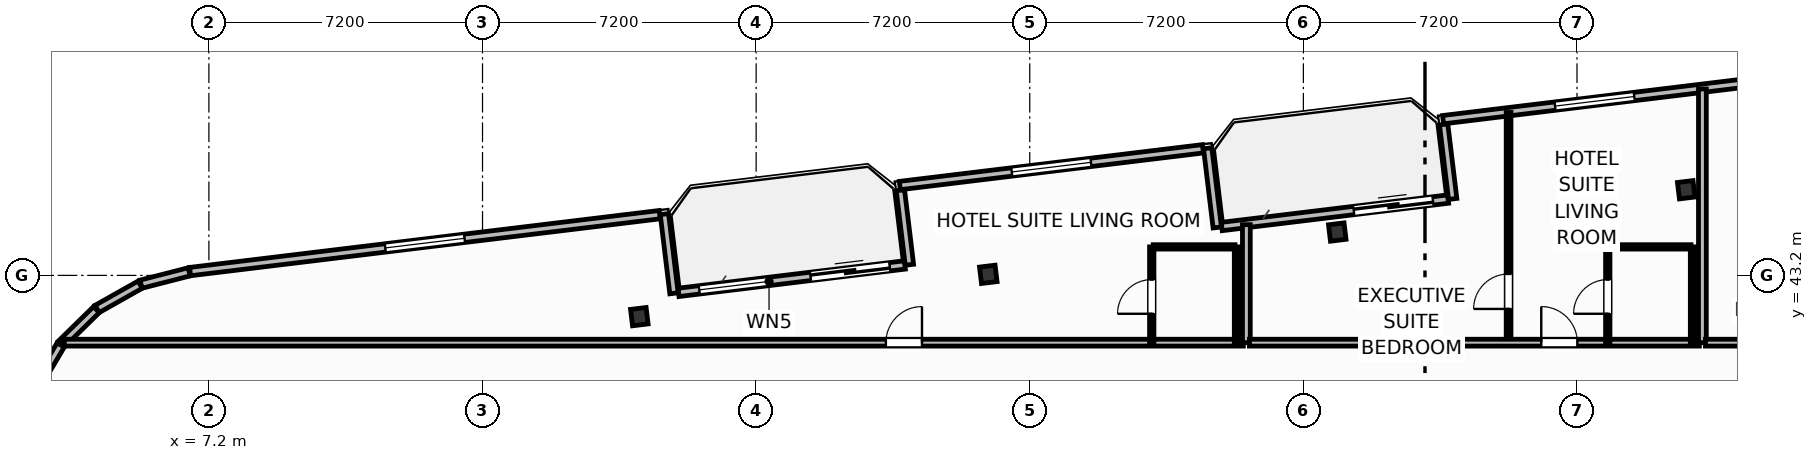
"""IFC4 building model, lengths in metres.
Left out: names, types, materials, properties, quantities, classifications, styles, units other than length and angle.
Written with IfcOpenShell. Run it as: python <this file> out.ifc"""

import sys

from ifc_helpers import new_model, si_unit, direction, frame, frame_2d, origin, origin_2d, place, context, subcontext, project, spatial, rectangle, i_section, extrude, element, fill, save


model = new_model("IFC4")
c1 = context("Model", 3, precision=1e-05, world=origin(), true_north=direction((0.0, 1.0)))
c2 = subcontext(c1, "Body", "Model", "MODEL_VIEW")
j1 = project(units=[si_unit("LENGTHUNIT", "METRE"), si_unit("PLANEANGLEUNIT", "RADIAN")], contexts=[c1])
p1 = place(None, origin())
s1 = spatial("IfcSite", under=j1, at=p1, CompositionType="ELEMENT")
p2 = place(p1, origin())
s2 = spatial("IfcBuilding", under=s1, at=p2, CompositionType="ELEMENT")
p3 = place(p2, frame((0.0, 0.0, 170.9)))
s3 = spatial("IfcBuildingStorey", under=s2, at=p3, CompositionType="ELEMENT", Elevation=170.9)
for number, where, z_axis, x_axis in (
    (1, (46.075, 45.454, 0.0), (0.0, 0.0, 1.0), (0.993, 0.12, 0.0)),
    (2, (36.892, 44.341, 0.0), (0.0, 0.0, 1.0), (0.993, 0.12, 0.0)),
    (3, (27.709, 43.227, 0.0), (0.0, 0.0, 1.0), (0.993, 0.12, 0.0)),
    (4, (18.526, 42.114, 0.0), (0.0, 0.0, 1.0), (0.993, 0.12, 0.0)),
):
    element("IfcColumn", number, at=place(p3, frame(where, z_axis=z_axis, x_axis=x_axis)), inside=s3, PredefinedType="COLUMN", context=c2, shape_type="SweptSolid", body=[
        extrude(i_section(OverallWidth=0.412, OverallDepth=0.435, WebThickness=0.036, FlangeThickness=0.057, FilletRadius=0.025, at=origin_2d()), origin(), (0.0, 0.0, 1.0), 3.7),
    ])
p4 = place(p3, frame((19.557, 42.753, 0.0), z_axis=(0.0, 0.0, 1.0), x_axis=(0.992729951822, 0.120362962556, 0.0)))
e5 = element("IfcWall", 5, at=p4, inside=s3, PredefinedType="SOLIDWALL", context=c2, shape_type="SweptSolid", body=[
    extrude(rectangle(XDim=6.0, YDim=0.22, at=frame_2d((3.0, 0.0))), origin(), (0.0, 0.0, 1.0), 2.73),
])
p5 = place(p4, frame((3.5, 0.0, 0.0)))
e6 = element("IfcOpeningElement", 6, at=p5, cuts=e5, PredefinedType="OPENING", context=c2, shape_type="SweptSolid", body=[
    extrude(rectangle(XDim=2.1, YDim=2.3, at=frame_2d((1.05, 1.15))), frame((0.0, 0.12, 0.0), z_axis=(0.0, -1.0, 0.0), x_axis=(1.0, 0.0, 0.0)), (0.0, 0.0, 1.0), 0.24),
])
p6 = place(p4, frame((0.55, 0.0, 0.75)))
e7 = element("IfcOpeningElement", 7, at=p6, cuts=e5, PredefinedType="OPENING", context=c2, shape_type="SweptSolid", body=[
    extrude(rectangle(XDim=1.85, YDim=1.75, at=frame_2d((0.925, 0.875))), frame((0.0, 0.12, 0.0), z_axis=(0.0, -1.0, 0.0), x_axis=(1.0, 0.0, 0.0)), (0.0, 0.0, 1.0), 0.24),
])
p7 = place(p3, frame((33.852, 44.486, 0.0), z_axis=(0.0, 0.0, 1.0), x_axis=(0.992729951822, 0.120362962556, 0.0)))
e8 = element("IfcWall", 8, at=p7, inside=s3, PredefinedType="SOLIDWALL", context=c2, shape_type="SweptSolid", body=[
    extrude(rectangle(XDim=6.0, YDim=0.22, at=frame_2d((3.0, 0.0))), origin(), (0.0, 0.0, 1.0), 2.73),
])
p8 = place(p7, frame((3.5, 0.0, 0.0)))
e9 = element("IfcOpeningElement", 9, at=p8, cuts=e8, PredefinedType="OPENING", context=c2, shape_type="SweptSolid", body=[
    extrude(rectangle(XDim=2.1, YDim=2.3, at=frame_2d((1.05, 1.15))), frame((0.0, 0.12, 0.0), z_axis=(0.0, -1.0, 0.0), x_axis=(1.0, 0.0, 0.0)), (0.0, 0.0, 1.0), 0.24),
])
p9 = place(p3, frame((47.653, 48.264, 0.0), z_axis=(0.0, 0.0, 1.0), x_axis=(-0.992731032022, -0.120354052946, 0.0)))
e10 = element("IfcWall", 10, at=p9, inside=s3, PredefinedType="SOLIDWALL", context=c2, shape_type="SweptSolid", body=[
    extrude(rectangle(XDim=8.035, YDim=0.22, at=frame_2d((4.018, 0.0))), origin(), (0.0, 0.0, 1.0), 2.73),
])
p10 = place(p9, frame((2.968, 0.0, 0.8)))
e11 = element("IfcOpeningElement", 11, at=p10, cuts=e10, PredefinedType="OPENING", context=c2, shape_type="SweptSolid", body=[
    extrude(rectangle(XDim=2.1, YDim=1.75, at=frame_2d((1.05, 0.875))), frame((0.0, 0.12, 0.0), z_axis=(0.0, -1.0, 0.0), x_axis=(1.0, 0.0, 0.0)), (0.0, 0.0, 1.0), 0.24),
])
p11 = place(p3, frame((39.691, 47.173, 0.0), z_axis=(0.0, 0.0, 1.0), x_axis=(0.120397815541, -0.992725725472, 0.0)))
e12 = element("IfcWall", 12, at=p11, inside=s3, PredefinedType="SOLIDWALL", context=c2, shape_type="SweptSolid", body=[
    extrude(rectangle(XDim=1.975, YDim=0.22, at=frame_2d((0.988, 0.0))), origin(), (0.0, 0.0, 1.0), 2.73),
])
p12 = place(p3, frame((33.734, 44.461, 0.0), z_axis=(0.0, 0.0, 1.0), x_axis=(-0.120327895535, 0.992734202874, 0.0)))
e13 = element("IfcWall", 13, at=p12, inside=s3, PredefinedType="SOLIDWALL", context=c2, shape_type="SweptSolid", body=[
    extrude(rectangle(XDim=2.1, YDim=0.22, at=frame_2d((1.05, 0.0))), origin(), (0.0, 0.0, 1.0), 2.73),
])
p13 = place(p3, frame((33.357, 46.531, 0.0), z_axis=(0.0, 0.0, 1.0), x_axis=(-0.992731032022, -0.120354052946, 0.0)))
e14 = element("IfcWall", 14, at=p13, inside=s3, PredefinedType="SOLIDWALL", context=c2, shape_type="SweptSolid", body=[
    extrude(rectangle(XDim=8.035, YDim=0.22, at=frame_2d((4.018, 0.0))), origin(), (0.0, 0.0, 1.0), 2.73),
])
p14 = place(p13, frame((2.968, 0.0, 0.8)))
e15 = element("IfcOpeningElement", 15, at=p14, cuts=e14, PredefinedType="OPENING", context=c2, shape_type="SweptSolid", body=[
    extrude(rectangle(XDim=2.1, YDim=1.75, at=frame_2d((1.05, 0.875))), frame((0.0, 0.12, 0.0), z_axis=(0.0, -1.0, 0.0), x_axis=(1.0, 0.0, 0.0)), (0.0, 0.0, 1.0), 0.24),
])
p15 = place(p3, frame((25.396, 45.44, 0.0), z_axis=(0.0, 0.0, 1.0), x_axis=(0.120275992932, -0.992740492538, 0.0)))
e16 = element("IfcWall", 16, at=p15, inside=s3, PredefinedType="SOLIDWALL", context=c2, shape_type="SweptSolid", body=[
    extrude(rectangle(XDim=1.975, YDim=0.22, at=frame_2d((0.988, 0.0))), origin(), (0.0, 0.0, 1.0), 2.73),
])
p16 = place(p3, frame((19.439, 42.729, 0.0), z_axis=(0.0, 0.0, 1.0), x_axis=(-0.120327895535, 0.992734202874, 0.0)))
e17 = element("IfcWall", 17, at=p16, inside=s3, PredefinedType="SOLIDWALL", context=c2, shape_type="SweptSolid", body=[
    extrude(rectangle(XDim=2.1, YDim=0.22, at=frame_2d((1.05, 0.0))), origin(), (0.0, 0.0, 1.0), 2.73),
])
p17 = place(p3, frame((19.062, 44.798, 0.0), z_axis=(0.0, 0.0, 1.0), x_axis=(-0.992733569027, -0.120333124809, 0.0)))
e18 = element("IfcWall", 18, at=p17, inside=s3, PredefinedType="SOLIDWALL", context=c2, shape_type="SweptSolid", body=[
    extrude(rectangle(XDim=12.447, YDim=0.22, at=frame_2d((6.224, 0.0))), origin(), (0.0, 0.0, 1.0), 2.73),
])
p18 = place(p17, frame((5.174, 0.0, 0.8)))
e19 = element("IfcOpeningElement", 19, at=p18, cuts=e18, PredefinedType="OPENING", context=c2, shape_type="SweptSolid", body=[
    extrude(rectangle(XDim=2.1, YDim=1.75, at=frame_2d((1.05, 0.875))), frame((0.0, 0.12, 0.0), z_axis=(0.0, -1.0, 0.0), x_axis=(1.0, 0.0, 0.0)), (0.0, 0.0, 1.0), 0.24),
])
p19 = place(p3, frame((6.681, 43.294, 0.0), z_axis=(0.0, 0.0, 1.0), x_axis=(-0.968496788899, -0.2490260426, 0.0)))
e20 = element("IfcWall", 20, at=p19, inside=s3, PredefinedType="SOLIDWALL", context=c2, shape_type="SweptSolid", body=[
    extrude(rectangle(XDim=1.309, YDim=0.22, at=frame_2d((0.654, 0.0))), origin(), (0.0, 0.0, 1.0), 2.73),
])
for number, where, z_axis, x_axis in (
    (21, (5.392, 42.956, 0.0), (0.0, 0.0, 1.0), (-0.871, -0.491, 0.0)),
    (22, (4.241, 42.3, 0.0), (0.0, 0.0, 1.0), (-0.714, -0.7, 0.0)),
):
    element("IfcWall", number, at=place(p3, frame(where, z_axis=z_axis, x_axis=x_axis)), inside=s3, PredefinedType="SOLIDWALL", context=c2, shape_type="SweptSolid", body=[
        extrude(rectangle(XDim=1.301, YDim=0.22, at=frame_2d((0.65, 0.0))), origin(), (0.0, 0.0, 1.0), 2.73),
    ])
p20 = place(p3, frame((3.299, 41.368, 0.0), z_axis=(0.0, 0.0, 1.0), x_axis=(-0.508716668029, -0.860933999601, 0.0)))
e23 = element("IfcWall", 23, at=p20, inside=s3, PredefinedType="SOLIDWALL", context=c2, shape_type="SweptSolid", body=[
    extrude(rectangle(XDim=1.301, YDim=0.22, at=frame_2d((0.65, 0.0))), origin(), (0.0, 0.0, 1.0), 2.73),
])
p21 = place(p3, frame((3.393, 41.43, 0.0), z_axis=(0.0, 0.0, 1.0), x_axis=(1.0, 0.0, 0.0)))
e24 = element("IfcWall", 24, at=p21, inside=s3, PredefinedType="PARTITIONING", context=c2, shape_type="SweptSolid", body=[
    extrude(rectangle(XDim=31.027, YDim=0.18, at=frame_2d((15.513, 0.0))), origin(), (0.0, 0.0, 1.0), 2.662),
])
p22 = place(p21, frame((21.621, 0.0, 0.0)))
e25 = element("IfcOpeningElement", 25, at=p22, cuts=e24, PredefinedType="OPENING", context=c2, shape_type="SweptSolid", body=[
    extrude(rectangle(XDim=0.95, YDim=2.15, at=frame_2d((0.475, 1.075))), frame((0.0, 0.1, 0.0), z_axis=(0.0, -1.0, 0.0), x_axis=(1.0, 0.0, 0.0)), (0.0, 0.0, 1.0), 0.2),
])
p23 = place(p3, frame((32.05, 43.95, 0.0), z_axis=(0.0, 0.0, 1.0), x_axis=(1.0, 0.0, 0.0)))
e26 = element("IfcWall", 26, at=p23, inside=s3, PredefinedType="PARTITIONING", context=c2, shape_type="SweptSolid", body=[
    extrude(rectangle(XDim=2.15, YDim=0.115, at=frame_2d((1.075, 0.0))), origin(), (0.0, 0.0, 1.0), 2.824),
])
p24 = place(p3, frame((32.01, 41.43, 0.0), z_axis=(0.0, 0.0, 1.0), x_axis=(0.0, 1.0, 0.0)))
e27 = element("IfcWall", 27, at=p24, inside=s3, PredefinedType="PARTITIONING", context=c2, shape_type="SweptSolid", body=[
    extrude(rectangle(XDim=2.52, YDim=0.115, at=frame_2d((1.26, 0.0))), origin(), (0.0, 0.0, 1.0), 3.45),
])
p25 = place(p24, frame((0.76, 0.0, 0.0)))
e28 = element("IfcOpeningElement", 28, at=p25, cuts=e27, PredefinedType="OPENING", context=c2, shape_type="SweptSolid", body=[
    extrude(rectangle(XDim=0.9, YDim=2.05, at=frame_2d((0.45, 1.025))), frame((0.0, 0.067, 0.0), z_axis=(0.0, -1.0, 0.0), x_axis=(1.0, 0.0, 0.0)), (0.0, 0.0, 1.0), 0.135),
])
p26 = place(p3, frame((34.24, 41.43, 0.0), z_axis=(0.0, 0.0, 1.0), x_axis=(0.0, 1.0, 0.0)))
e29 = element("IfcWall", 29, at=p26, inside=s3, PredefinedType="PARTITIONING", context=c2, shape_type="SweptSolid", body=[
    extrude(rectangle(XDim=2.52, YDim=0.115, at=frame_2d((1.26, 0.0))), origin(), (0.0, 0.0, 1.0), 3.45),
])
p27 = place(p3, frame((34.5, 41.43, 0.0), z_axis=(0.0, 0.0, 1.0), x_axis=(0.0, 1.0, 0.0)))
e30 = element("IfcWall", 30, at=p27, inside=s3, PredefinedType="PARTITIONING", context=c2, shape_type="SweptSolid", body=[
    extrude(rectangle(XDim=3.104, YDim=0.205, at=frame_2d((1.552, 0.0))), origin(), (0.0, 0.0, 1.0), 3.45),
])
p28 = place(p3, frame((41.4, 41.43, 0.0), z_axis=(0.0, 0.0, 1.0), x_axis=(0.0, 1.0, 0.0)))
e31 = element("IfcWall", 31, at=p28, inside=s3, PredefinedType="PARTITIONING", context=c2, shape_type="SweptSolid", body=[
    extrude(rectangle(XDim=6.056, YDim=0.125, at=frame_2d((3.028, 0.0))), origin(), (0.0, 0.0, 1.0), 3.45),
])
p29 = place(p28, frame((0.888, 0.0, 0.0)))
e32 = element("IfcOpeningElement", 32, at=p29, cuts=e31, PredefinedType="OPENING", context=c2, shape_type="SweptSolid", body=[
    extrude(rectangle(XDim=0.92, YDim=2.05, at=frame_2d((0.46, 1.025))), frame((0.0, 0.073, 0.0), z_axis=(0.0, -1.0, 0.0), x_axis=(1.0, 0.0, 0.0)), (0.0, 0.0, 1.0), 0.145),
])
p30 = place(p3, frame((34.58, 41.43, 0.0), z_axis=(0.0, 0.0, 1.0), x_axis=(1.0, 0.0, 0.0)))
e33 = element("IfcWall", 33, at=p30, inside=s3, PredefinedType="PARTITIONING", context=c2, shape_type="SweptSolid", body=[
    extrude(rectangle(XDim=11.84, YDim=0.18, at=frame_2d((5.92, 0.0))), origin(), (0.0, 0.0, 1.0), 3.45),
])
p31 = place(p30, frame((7.68, 0.0, 0.0)))
e34 = element("IfcOpeningElement", 34, at=p31, cuts=e33, PredefinedType="OPENING", context=c2, shape_type="SweptSolid", body=[
    extrude(rectangle(XDim=0.95, YDim=2.15, at=frame_2d((0.475, 1.075))), frame((0.0, 0.1, 0.0), z_axis=(0.0, -1.0, 0.0), x_axis=(1.0, 0.0, 0.0)), (0.0, 0.0, 1.0), 0.2),
])
p32 = place(p3, frame((44.05, 43.95, 0.0), z_axis=(0.0, 0.0, 1.0), x_axis=(1.0, 0.0, 0.0)))
e35 = element("IfcWall", 35, at=p32, inside=s3, PredefinedType="PARTITIONING", context=c2, shape_type="SweptSolid", body=[
    extrude(rectangle(XDim=2.15, YDim=0.115, at=frame_2d((1.075, 0.0))), origin(), (0.0, 0.0, 1.0), 3.45),
])
p33 = place(p3, frame((44.01, 41.43, 0.0), z_axis=(0.0, 0.0, 1.0), x_axis=(0.0, 1.0, 0.0)))
e36 = element("IfcWall", 36, at=p33, inside=s3, PredefinedType="PARTITIONING", context=c2, shape_type="SweptSolid", body=[
    extrude(rectangle(XDim=2.52, YDim=0.115, at=frame_2d((1.26, 0.0))), origin(), (0.0, 0.0, 1.0), 3.45),
])
p34 = place(p33, frame((0.76, 0.0, 0.0)))
e37 = element("IfcOpeningElement", 37, at=p34, cuts=e36, PredefinedType="OPENING", context=c2, shape_type="SweptSolid", body=[
    extrude(rectangle(XDim=0.9, YDim=2.05, at=frame_2d((0.45, 1.025))), frame((0.0, 0.067, 0.0), z_axis=(0.0, -1.0, 0.0), x_axis=(1.0, 0.0, 0.0)), (0.0, 0.0, 1.0), 0.135),
])
p35 = place(p3, frame((46.24, 41.43, 0.0), z_axis=(0.0, 0.0, 1.0), x_axis=(0.0, 1.0, 0.0)))
e38 = element("IfcWall", 38, at=p35, inside=s3, PredefinedType="PARTITIONING", context=c2, shape_type="SweptSolid", body=[
    extrude(rectangle(XDim=2.52, YDim=0.115, at=frame_2d((1.26, 0.0))), origin(), (0.0, 0.0, 1.0), 3.45),
])
p36 = place(p3, frame((46.5, 41.43, 0.0), z_axis=(0.0, 0.0, 1.0), x_axis=(0.0, 1.0, 0.0)))
e39 = element("IfcWall", 39, at=p36, inside=s3, PredefinedType="PARTITIONING", context=c2, shape_type="SweptSolid", body=[
    extrude(rectangle(XDim=6.674, YDim=0.205, at=frame_2d((3.337, 0.0))), origin(), (0.0, 0.0, 1.0), 2.662),
])
p37 = place(p3, frame((46.58, 41.43, 0.0), z_axis=(0.0, 0.0, 1.0), x_axis=(1.0, 0.0, 0.0)))
e40 = element("IfcWall", 40, at=p37, inside=s3, PredefinedType="PARTITIONING", context=c2, shape_type="SweptSolid", body=[
    extrude(rectangle(XDim=26.042, YDim=0.18, at=frame_2d((13.021, 0.0))), origin(), (0.0, 0.0, 1.0), 3.45),
])
p38 = place(p37, frame((0.926, 0.0, 0.0)))
e41 = element("IfcOpeningElement", 41, at=p38, cuts=e40, PredefinedType="OPENING", context=c2, shape_type="SweptSolid", body=[
    extrude(rectangle(XDim=0.95, YDim=2.15, at=frame_2d((0.475, 1.075))), frame((0.0, 0.1, 0.0), z_axis=(0.0, -1.0, 0.0), x_axis=(1.0, 0.0, 0.0)), (0.0, 0.0, 1.0), 0.2),
])
p39 = place(p5, origin())
e42 = element("IfcDoor", 42, at=p39, inside=s3, OperationType="SLIDING_TO_LEFT", PredefinedType="DOOR", context=c2, shape_type="SweptSolid", body=[
    extrude(rectangle(XDim=2.1, YDim=2.3, at=frame_2d((1.05, 1.15))), frame((0.0, 0.025, 0.0), z_axis=(0.0, -1.0, 0.0), x_axis=(1.0, 0.0, 0.0)), (0.0, 0.0, 1.0), 0.05),
])
fill(e6, e42)
p40 = place(p6, origin())
e43 = element("IfcWindow", 43, at=p40, inside=s3, PartitioningType="SINGLE_PANEL", PredefinedType="WINDOW", context=c2, shape_type="SweptSolid", body=[
    extrude(rectangle(XDim=1.85, YDim=1.75, at=frame_2d((0.925, 0.875))), frame((0.0, 0.03, 0.0), z_axis=(0.0, -1.0, 0.0), x_axis=(1.0, 0.0, 0.0)), (0.0, 0.0, 1.0), 0.06),
])
fill(e7, e43)
p41 = place(p8, origin())
e44 = element("IfcDoor", 44, at=p41, inside=s3, OperationType="SLIDING_TO_LEFT", PredefinedType="DOOR", context=c2, shape_type="SweptSolid", body=[
    extrude(rectangle(XDim=2.1, YDim=2.3, at=frame_2d((1.05, 1.15))), frame((0.0, 0.025, 0.0), z_axis=(0.0, -1.0, 0.0), x_axis=(1.0, 0.0, 0.0)), (0.0, 0.0, 1.0), 0.05),
])
fill(e9, e44)
p42 = place(p10, origin())
e45 = element("IfcWindow", 45, at=p42, inside=s3, PartitioningType="SINGLE_PANEL", PredefinedType="WINDOW", context=c2, shape_type="SweptSolid", body=[
    extrude(rectangle(XDim=2.1, YDim=1.75, at=frame_2d((1.05, 0.875))), frame((0.0, 0.03, 0.0), z_axis=(0.0, -1.0, 0.0), x_axis=(1.0, 0.0, 0.0)), (0.0, 0.0, 1.0), 0.06),
])
fill(e11, e45)
p43 = place(p14, origin())
e46 = element("IfcWindow", 46, at=p43, inside=s3, PartitioningType="SINGLE_PANEL", PredefinedType="WINDOW", context=c2, shape_type="SweptSolid", body=[
    extrude(rectangle(XDim=2.1, YDim=1.75, at=frame_2d((1.05, 0.875))), frame((0.0, 0.03, 0.0), z_axis=(0.0, -1.0, 0.0), x_axis=(1.0, 0.0, 0.0)), (0.0, 0.0, 1.0), 0.06),
])
fill(e15, e46)
p44 = place(p18, origin())
e47 = element("IfcWindow", 47, at=p44, inside=s3, PartitioningType="SINGLE_PANEL", PredefinedType="WINDOW", context=c2, shape_type="SweptSolid", body=[
    extrude(rectangle(XDim=2.1, YDim=1.75, at=frame_2d((1.05, 0.875))), frame((0.0, 0.03, 0.0), z_axis=(0.0, -1.0, 0.0), x_axis=(1.0, 0.0, 0.0)), (0.0, 0.0, 1.0), 0.06),
])
fill(e19, e47)
p45 = place(p22, origin())
e48 = element("IfcDoor", 48, at=p45, inside=s3, OperationType="SINGLE_SWING_RIGHT", PredefinedType="DOOR", context=c2, shape_type="SweptSolid", body=[
    extrude(rectangle(XDim=0.95, YDim=2.15, at=frame_2d((0.475, 1.075))), frame((0.0, 0.025, 0.0), z_axis=(0.0, -1.0, 0.0), x_axis=(1.0, 0.0, 0.0)), (0.0, 0.0, 1.0), 0.05),
])
fill(e25, e48)
p46 = place(p25, origin())
e49 = element("IfcDoor", 49, at=p46, inside=s3, OperationType="SINGLE_SWING_LEFT", PredefinedType="DOOR", context=c2, shape_type="SweptSolid", body=[
    extrude(rectangle(XDim=0.9, YDim=2.05, at=frame_2d((0.45, 1.025))), frame((0.0, 0.025, 0.0), z_axis=(0.0, -1.0, 0.0), x_axis=(1.0, 0.0, 0.0)), (0.0, 0.0, 1.0), 0.05),
])
fill(e28, e49)
p47 = place(p29, origin())
e50 = element("IfcDoor", 50, at=p47, inside=s3, OperationType="SINGLE_SWING_LEFT", PredefinedType="DOOR", context=c2, shape_type="SweptSolid", body=[
    extrude(rectangle(XDim=0.92, YDim=2.05, at=frame_2d((0.46, 1.025))), frame((0.0, 0.025, 0.0), z_axis=(0.0, -1.0, 0.0), x_axis=(1.0, 0.0, 0.0)), (0.0, 0.0, 1.0), 0.05),
])
fill(e32, e50)
p48 = place(p31, origin())
e51 = element("IfcDoor", 51, at=p48, inside=s3, OperationType="SINGLE_SWING_LEFT", PredefinedType="DOOR", context=c2, shape_type="SweptSolid", body=[
    extrude(rectangle(XDim=0.95, YDim=2.15, at=frame_2d((0.475, 1.075))), frame((0.0, 0.025, 0.0), z_axis=(0.0, -1.0, 0.0), x_axis=(1.0, 0.0, 0.0)), (0.0, 0.0, 1.0), 0.05),
])
fill(e34, e51)
p49 = place(p34, origin())
e52 = element("IfcDoor", 52, at=p49, inside=s3, OperationType="SINGLE_SWING_LEFT", PredefinedType="DOOR", context=c2, shape_type="SweptSolid", body=[
    extrude(rectangle(XDim=0.9, YDim=2.05, at=frame_2d((0.45, 1.025))), frame((0.0, 0.025, 0.0), z_axis=(0.0, -1.0, 0.0), x_axis=(1.0, 0.0, 0.0)), (0.0, 0.0, 1.0), 0.05),
])
fill(e37, e52)
save(model, sys.argv[1])
